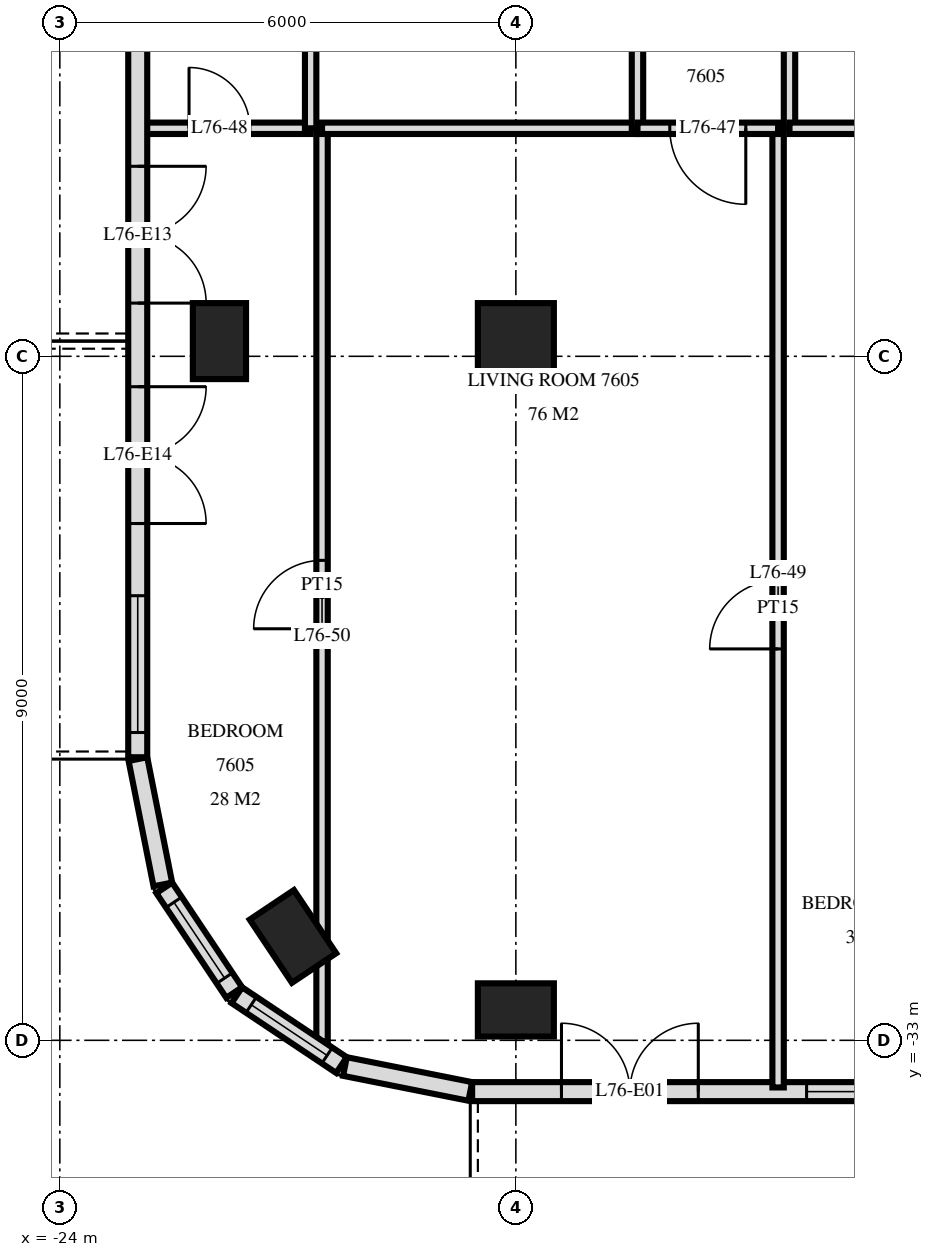
"""IFC4 building model, lengths in metres.
Left out: names, types, materials, properties, quantities, classifications, styles, units other than length and angle.
Written with IfcOpenShell. Run it as: python <this file> out.ifc"""

import sys

from ifc_helpers import new_model, si_unit, direction, frame, frame_2d, origin, origin_2d, place, context, subcontext, project, spatial, rectangle, extrude, element, fill, save


model = new_model("IFC4")
c1 = context("Model", 3, precision=1e-05, world=origin(), true_north=direction((0.0, 1.0)))
c2 = subcontext(c1, "Body", "Model", "MODEL_VIEW")
j1 = project(units=[si_unit("LENGTHUNIT", "METRE"), si_unit("PLANEANGLEUNIT", "RADIAN")], contexts=[c1])
p1 = place(None, origin())
s1 = spatial("IfcSite", under=j1, at=p1, CompositionType="ELEMENT")
p2 = place(p1, origin())
s2 = spatial("IfcBuilding", under=s1, at=p2, CompositionType="ELEMENT")
p3 = place(p2, frame((0.0, 0.0, 287.6)))
s3 = spatial("IfcBuildingStorey", under=s2, at=p3, CompositionType="ELEMENT", Elevation=287.6)
for number, where, z_axis, x_axis in (
    (1, (-21.9, -23.8, 0.0), (0.0, 0.0, 1.0), (0.0, 1.0, 0.0)),
    (2, (-20.933, -31.633, 0.0), (0.0, 0.0, 1.0), (-0.556, 0.831, 0.0)),
    (3, (-18.0, -32.6, 0.0), (0.0, 0.0, 1.0), (1.0, 0.0, 0.0)),
):
    element("IfcColumn", number, at=place(p3, frame(where, z_axis=z_axis, x_axis=x_axis)), inside=s3, PredefinedType="COLUMN", context=c2, shape_type="SweptSolid", body=[
        extrude(rectangle(XDim=1.0, YDim=0.7, at=origin_2d()), origin(), (0.0, 0.0, 1.0), 3.5),
    ])
p4 = place(p3, frame((-18.0, -23.8, 0.0), z_axis=(0.0, 0.0, 1.0), x_axis=(1.0, 0.0, 0.0)))
e4 = element("IfcColumn", 4, at=p4, inside=s3, PredefinedType="COLUMN", context=c2, shape_type="SweptSolid", body=[
    extrude(rectangle(XDim=1.0, YDim=1.0, at=origin_2d()), origin(), (0.0, 0.0, 1.0), 3.5),
])
p5 = place(p3, frame((-22.975, -3.325, 0.0), z_axis=(0.0, 0.0, 1.0), x_axis=(0.0, -1.0, 0.0)))
e5 = element("IfcWall", 5, at=p5, inside=s3, PredefinedType="SOLIDWALL", context=c2, shape_type="SweptSolid", body=[
    extrude(rectangle(XDim=25.951, YDim=0.25, at=frame_2d((12.975, 0.0))), origin(), (0.0, 0.0, 1.0), 3.22),
])
p6 = place(p5, frame((1.475, 0.0, 0.0)))
e6 = element("IfcOpeningElement", 6, at=p6, cuts=e5, PredefinedType="OPENING", context=c2, shape_type="SweptSolid", body=[
    extrude(rectangle(XDim=1.8, YDim=2.4, at=frame_2d((0.9, 1.2))), frame((0.0, 0.135, 0.0), z_axis=(0.0, -1.0, 0.0), x_axis=(1.0, 0.0, 0.0)), (0.0, 0.0, 1.0), 0.27),
])
p7 = place(p5, frame((7.975, 0.0, 0.0)))
e7 = element("IfcOpeningElement", 7, at=p7, cuts=e5, PredefinedType="OPENING", context=c2, shape_type="SweptSolid", body=[
    extrude(rectangle(XDim=1.8, YDim=2.4, at=frame_2d((0.9, 1.2))), frame((0.0, 0.135, 0.0), z_axis=(0.0, -1.0, 0.0), x_axis=(1.0, 0.0, 0.0)), (0.0, 0.0, 1.0), 0.27),
])
p8 = place(p5, frame((18.175, 0.0, 0.0)))
e8 = element("IfcOpeningElement", 8, at=p8, cuts=e5, PredefinedType="OPENING", context=c2, shape_type="SweptSolid", body=[
    extrude(rectangle(XDim=1.8, YDim=2.4, at=frame_2d((0.9, 1.2))), frame((0.0, 0.135, 0.0), z_axis=(0.0, -1.0, 0.0), x_axis=(1.0, 0.0, 0.0)), (0.0, 0.0, 1.0), 0.27),
])
p9 = place(p5, frame((21.075, 0.0, 0.0)))
e9 = element("IfcOpeningElement", 9, at=p9, cuts=e5, PredefinedType="OPENING", context=c2, shape_type="SweptSolid", body=[
    extrude(rectangle(XDim=1.8, YDim=2.4, at=frame_2d((0.9, 1.2))), frame((0.0, 0.135, 0.0), z_axis=(0.0, -1.0, 0.0), x_axis=(1.0, 0.0, 0.0)), (0.0, 0.0, 1.0), 0.27),
])
p10 = place(p5, frame((23.825, 0.0, 0.9)))
e10 = element("IfcOpeningElement", 10, at=p10, cuts=e5, PredefinedType="OPENING", context=c2, shape_type="SweptSolid", body=[
    extrude(rectangle(XDim=1.8, YDim=1.5, at=frame_2d((0.9, 0.75))), frame((0.0, 0.135, 0.0), z_axis=(0.0, -1.0, 0.0), x_axis=(1.0, 0.0, 0.0)), (0.0, 0.0, 1.0), 0.27),
])
p11 = place(p3, frame((-22.973, -29.3, 0.0), z_axis=(0.0, 0.0, 1.0), x_axis=(0.19513878023, -0.980775640221, 0.0)))
e11 = element("IfcWall", 11, at=p11, inside=s3, PredefinedType="SOLIDWALL", context=c2, shape_type="SweptSolid", body=[
    extrude(rectangle(XDim=1.681, YDim=0.25, at=frame_2d((0.841, 0.0))), origin(), (0.0, 0.0, 1.0), 3.22),
])
p12 = place(p3, frame((-22.626, -30.994, 0.0), z_axis=(0.0, 0.0, 1.0), x_axis=(0.55555029066, -0.831482937015, 0.0)))
e12 = element("IfcWall", 12, at=p12, inside=s3, PredefinedType="SOLIDWALL", context=c2, shape_type="SweptSolid", body=[
    extrude(rectangle(XDim=1.656, YDim=0.25, at=frame_2d((0.828, 0.0))), origin(), (0.0, 0.0, 1.0), 3.22),
])
p13 = place(p12, frame((0.228, 0.0, 0.9)))
e13 = element("IfcOpeningElement", 13, at=p13, cuts=e12, PredefinedType="OPENING", context=c2, shape_type="SweptSolid", body=[
    extrude(rectangle(XDim=1.2, YDim=1.5, at=frame_2d((0.6, 0.75))), frame((0.0, 0.135, 0.0), z_axis=(0.0, -1.0, 0.0), x_axis=(1.0, 0.0, 0.0)), (0.0, 0.0, 1.0), 0.27),
])
p14 = place(p3, frame((-21.671, -32.406, 0.0), z_axis=(0.0, 0.0, 1.0), x_axis=(0.831482937015, -0.55555029066, 0.0)))
e14 = element("IfcWall", 14, at=p14, inside=s3, PredefinedType="SOLIDWALL", context=c2, shape_type="SweptSolid", body=[
    extrude(rectangle(XDim=1.656, YDim=0.25, at=frame_2d((0.828, 0.0))), origin(), (0.0, 0.0, 1.0), 3.22),
])
p15 = place(p14, frame((0.228, 0.0, 0.9)))
e15 = element("IfcOpeningElement", 15, at=p15, cuts=e14, PredefinedType="OPENING", context=c2, shape_type="SweptSolid", body=[
    extrude(rectangle(XDim=1.2, YDim=1.5, at=frame_2d((0.6, 0.75))), frame((0.0, 0.135, 0.0), z_axis=(0.0, -1.0, 0.0), x_axis=(1.0, 0.0, 0.0)), (0.0, 0.0, 1.0), 0.27),
])
p16 = place(p3, frame((-20.249, -33.344, 0.0), z_axis=(0.0, 0.0, 1.0), x_axis=(0.980770110232, -0.195166572128, 0.0)))
e16 = element("IfcWall", 16, at=p16, inside=s3, PredefinedType="SOLIDWALL", context=c2, shape_type="SweptSolid", body=[
    extrude(rectangle(XDim=1.681, YDim=0.25, at=frame_2d((0.841, 0.0))), origin(), (0.0, 0.0, 1.0), 3.22),
])
p17 = place(p3, frame((-18.575, -33.675, 0.0), z_axis=(0.0, 0.0, 1.0), x_axis=(1.0, 0.0, 0.0)))
e17 = element("IfcWall", 17, at=p17, inside=s3, PredefinedType="SOLIDWALL", context=c2, shape_type="SweptSolid", body=[
    extrude(rectangle(XDim=37.151, YDim=0.25, at=frame_2d((18.575, 0.0))), origin(), (0.0, 0.0, 1.0), 3.22),
])
p18 = place(p17, frame((1.175, 0.0, 0.0)))
e18 = element("IfcOpeningElement", 18, at=p18, cuts=e17, PredefinedType="OPENING", context=c2, shape_type="SweptSolid", body=[
    extrude(rectangle(XDim=1.8, YDim=2.4, at=frame_2d((0.9, 1.2))), frame((0.0, 0.135, 0.0), z_axis=(0.0, -1.0, 0.0), x_axis=(1.0, 0.0, 0.0)), (0.0, 0.0, 1.0), 0.27),
])
p19 = place(p17, frame((4.4, 0.0, 0.9)))
e19 = element("IfcOpeningElement", 19, at=p19, cuts=e17, PredefinedType="OPENING", context=c2, shape_type="SweptSolid", body=[
    extrude(rectangle(XDim=1.8, YDim=1.5, at=frame_2d((0.9, 0.75))), frame((0.0, 0.135, 0.0), z_axis=(0.0, -1.0, 0.0), x_axis=(1.0, 0.0, 0.0)), (0.0, 0.0, 1.0), 0.27),
])
p20 = place(p17, frame((6.875, 0.0, 0.9)))
e20 = element("IfcOpeningElement", 20, at=p20, cuts=e17, PredefinedType="OPENING", context=c2, shape_type="SweptSolid", body=[
    extrude(rectangle(XDim=2.4, YDim=1.5, at=frame_2d((1.2, 0.75))), frame((0.0, 0.135, 0.0), z_axis=(0.0, -1.0, 0.0), x_axis=(1.0, 0.0, 0.0)), (0.0, 0.0, 1.0), 0.27),
])
p21 = place(p17, frame((10.175, 0.0, 0.0)))
e21 = element("IfcOpeningElement", 21, at=p21, cuts=e17, PredefinedType="OPENING", context=c2, shape_type="SweptSolid", body=[
    extrude(rectangle(XDim=1.8, YDim=2.4, at=frame_2d((0.9, 1.2))), frame((0.0, 0.135, 0.0), z_axis=(0.0, -1.0, 0.0), x_axis=(1.0, 0.0, 0.0)), (0.0, 0.0, 1.0), 0.27),
])
p22 = place(p17, frame((13.175, 0.0, 0.0)))
e22 = element("IfcOpeningElement", 22, at=p22, cuts=e17, PredefinedType="OPENING", context=c2, shape_type="SweptSolid", body=[
    extrude(rectangle(XDim=1.8, YDim=2.4, at=frame_2d((0.9, 1.2))), frame((0.0, 0.135, 0.0), z_axis=(0.0, -1.0, 0.0), x_axis=(1.0, 0.0, 0.0)), (0.0, 0.0, 1.0), 0.27),
])
p23 = place(p17, frame((15.875, 0.0, 0.9)))
e23 = element("IfcOpeningElement", 23, at=p23, cuts=e17, PredefinedType="OPENING", context=c2, shape_type="SweptSolid", body=[
    extrude(rectangle(XDim=2.4, YDim=1.5, at=frame_2d((1.2, 0.75))), frame((0.0, 0.135, 0.0), z_axis=(0.0, -1.0, 0.0), x_axis=(1.0, 0.0, 0.0)), (0.0, 0.0, 1.0), 0.27),
])
p24 = place(p17, frame((19.175, 0.0, 0.0)))
e24 = element("IfcOpeningElement", 24, at=p24, cuts=e17, PredefinedType="OPENING", context=c2, shape_type="SweptSolid", body=[
    extrude(rectangle(XDim=1.8, YDim=2.4, at=frame_2d((0.9, 1.2))), frame((0.0, 0.135, 0.0), z_axis=(0.0, -1.0, 0.0), x_axis=(1.0, 0.0, 0.0)), (0.0, 0.0, 1.0), 0.27),
])
p25 = place(p17, frame((21.875, 0.0, 0.9)))
e25 = element("IfcOpeningElement", 25, at=p25, cuts=e17, PredefinedType="OPENING", context=c2, shape_type="SweptSolid", body=[
    extrude(rectangle(XDim=2.4, YDim=1.5, at=frame_2d((1.2, 0.75))), frame((0.0, 0.135, 0.0), z_axis=(0.0, -1.0, 0.0), x_axis=(1.0, 0.0, 0.0)), (0.0, 0.0, 1.0), 0.27),
])
p26 = place(p17, frame((25.063, 0.0, 0.9)))
e26 = element("IfcOpeningElement", 26, at=p26, cuts=e17, PredefinedType="OPENING", context=c2, shape_type="SweptSolid", body=[
    extrude(rectangle(XDim=1.8, YDim=1.5, at=frame_2d((0.9, 0.75))), frame((0.0, 0.135, 0.0), z_axis=(0.0, -1.0, 0.0), x_axis=(1.0, 0.0, 0.0)), (0.0, 0.0, 1.0), 0.27),
])
p27 = place(p17, frame((27.838, 0.0, 0.0)))
e27 = element("IfcOpeningElement", 27, at=p27, cuts=e17, PredefinedType="OPENING", context=c2, shape_type="SweptSolid", body=[
    extrude(rectangle(XDim=1.8, YDim=2.4, at=frame_2d((0.9, 1.2))), frame((0.0, 0.135, 0.0), z_axis=(0.0, -1.0, 0.0), x_axis=(1.0, 0.0, 0.0)), (0.0, 0.0, 1.0), 0.27),
])
p28 = place(p17, frame((31.175, 0.0, 0.0)))
e28 = element("IfcOpeningElement", 28, at=p28, cuts=e17, PredefinedType="OPENING", context=c2, shape_type="SweptSolid", body=[
    extrude(rectangle(XDim=1.8, YDim=2.4, at=frame_2d((0.9, 1.2))), frame((0.0, 0.135, 0.0), z_axis=(0.0, -1.0, 0.0), x_axis=(1.0, 0.0, 0.0)), (0.0, 0.0, 1.0), 0.27),
])
p29 = place(p3, frame((-14.4, -21.0, 0.0), z_axis=(0.0, 0.0, 1.0), x_axis=(0.0, 1.0, 0.0)))
e29 = element("IfcWall", 29, at=p29, inside=s3, PredefinedType="PARTITIONING", context=c2, shape_type="SweptSolid", body=[
    extrude(rectangle(XDim=4.2, YDim=0.15, at=frame_2d((2.1, 0.0))), origin(), (0.0, 0.0, 1.0), 3.22),
])
p30 = place(p29, frame((1.6, 0.0, 0.0)))
e30 = element("IfcOpeningElement", 30, at=p30, cuts=e29, PredefinedType="OPENING", context=c2, shape_type="SweptSolid", body=[
    extrude(rectangle(XDim=1.0, YDim=2.1, at=frame_2d((0.5, 1.05))), frame((0.0, 0.085, 0.0), z_axis=(0.0, -1.0, 0.0), x_axis=(1.0, 0.0, 0.0)), (0.0, 0.0, 1.0), 0.17),
])
p31 = place(p3, frame((-14.55, -33.62, 0.0), z_axis=(0.0, 0.0, 1.0), x_axis=(0.0, 1.0, 0.0)))
e31 = element("IfcWall", 31, at=p31, inside=s3, PredefinedType="PARTITIONING", context=c2, shape_type="SweptSolid", body=[
    extrude(rectangle(XDim=12.62, YDim=0.15, at=frame_2d((6.31, 0.0))), origin(), (0.0, 0.0, 1.0), 3.22),
])
p32 = place(p31, frame((5.77, 0.0, 0.0)))
e32 = element("IfcOpeningElement", 32, at=p32, cuts=e31, PredefinedType="OPENING", context=c2, shape_type="SweptSolid", body=[
    extrude(rectangle(XDim=0.9, YDim=2.1, at=frame_2d((0.45, 1.05))), frame((0.0, 0.085, 0.0), z_axis=(0.0, -1.0, 0.0), x_axis=(1.0, 0.0, 0.0)), (0.0, 0.0, 1.0), 0.17),
])
p33 = place(p3, frame((-16.4, -21.0, 0.0), z_axis=(0.0, 0.0, 1.0), x_axis=(0.0, 1.0, 0.0)))
e33 = element("IfcWall", 33, at=p33, inside=s3, PredefinedType="PARTITIONING", context=c2, shape_type="SweptSolid", body=[
    extrude(rectangle(XDim=4.2, YDim=0.15, at=frame_2d((2.1, 0.0))), origin(), (0.0, 0.0, 1.0), 3.22),
])
p34 = place(p33, frame((1.6, 0.0, 0.0)))
e34 = element("IfcOpeningElement", 34, at=p34, cuts=e33, PredefinedType="OPENING", context=c2, shape_type="SweptSolid", body=[
    extrude(rectangle(XDim=1.0, YDim=2.1, at=frame_2d((0.5, 1.05))), frame((0.0, 0.085, 0.0), z_axis=(0.0, -1.0, 0.0), x_axis=(1.0, 0.0, 0.0)), (0.0, 0.0, 1.0), 0.17),
])
p35 = place(p3, frame((-20.55, -33.017, 0.0), z_axis=(0.0, 0.0, 1.0), x_axis=(0.0, 1.0, 0.0)))
e35 = element("IfcWall", 35, at=p35, inside=s3, PredefinedType="PARTITIONING", context=c2, shape_type="SweptSolid", body=[
    extrude(rectangle(XDim=12.017, YDim=0.15, at=frame_2d((6.008, 0.0))), origin(), (0.0, 0.0, 1.0), 3.22),
])
p36 = place(p35, frame((5.432, 0.0, 0.0)))
e36 = element("IfcOpeningElement", 36, at=p36, cuts=e35, PredefinedType="OPENING", context=c2, shape_type="SweptSolid", body=[
    extrude(rectangle(XDim=0.9, YDim=2.1, at=frame_2d((0.45, 1.05))), frame((0.0, 0.085, 0.0), z_axis=(0.0, -1.0, 0.0), x_axis=(1.0, 0.0, 0.0)), (0.0, 0.0, 1.0), 0.17),
])
p37 = place(p3, frame((-20.7, -21.0, 0.0), z_axis=(0.0, 0.0, 1.0), x_axis=(0.0, 1.0, 0.0)))
e37 = element("IfcWall", 37, at=p37, inside=s3, PredefinedType="PARTITIONING", context=c2, shape_type="SweptSolid", body=[
    extrude(rectangle(XDim=4.2, YDim=0.15, at=frame_2d((2.1, 0.0))), origin(), (0.0, 0.0, 1.0), 3.22),
])
p38 = place(p3, frame((-16.4, -21.0, 0.0), z_axis=(0.0, 0.0, 1.0), x_axis=(1.0, 0.0, 0.0)))
e38 = element("IfcWall", 38, at=p38, inside=s3, PredefinedType="PARTITIONING", context=c2, shape_type="SweptSolid", body=[
    extrude(rectangle(XDim=1.85, YDim=0.15, at=frame_2d((0.925, 0.0))), origin(), (0.0, 0.0, 1.0), 3.22),
])
p39 = place(p38, frame((0.425, 0.0, 0.0)))
e39 = element("IfcOpeningElement", 39, at=p39, cuts=e38, PredefinedType="OPENING", context=c2, shape_type="SweptSolid", body=[
    extrude(rectangle(XDim=1.0, YDim=2.1, at=frame_2d((0.5, 1.05))), frame((0.0, 0.085, 0.0), z_axis=(0.0, -1.0, 0.0), x_axis=(1.0, 0.0, 0.0)), (0.0, 0.0, 1.0), 0.17),
])
p40 = place(p3, frame((-22.92, -21.0, 0.0), z_axis=(0.0, 0.0, 1.0), x_axis=(1.0, 0.0, 0.0)))
e40 = element("IfcWall", 40, at=p40, inside=s3, PredefinedType="PARTITIONING", context=c2, shape_type="SweptSolid", body=[
    extrude(rectangle(XDim=2.22, YDim=0.15, at=frame_2d((1.11, 0.0))), origin(), (0.0, 0.0, 1.0), 3.22),
])
p41 = place(p40, frame((0.62, 0.0, 0.0)))
e41 = element("IfcOpeningElement", 41, at=p41, cuts=e40, PredefinedType="OPENING", context=c2, shape_type="SweptSolid", body=[
    extrude(rectangle(XDim=0.8, YDim=2.1, at=frame_2d((0.4, 1.05))), frame((0.0, 0.085, 0.0), z_axis=(0.0, -1.0, 0.0), x_axis=(1.0, 0.0, 0.0)), (0.0, 0.0, 1.0), 0.17),
])
p42 = place(p3, frame((-20.55, -21.0, 0.0), z_axis=(0.0, 0.0, 1.0), x_axis=(1.0, 0.0, 0.0)))
e42 = element("IfcWall", 42, at=p42, inside=s3, PredefinedType="PARTITIONING", context=c2, shape_type="SweptSolid", body=[
    extrude(rectangle(XDim=4.15, YDim=0.15, at=frame_2d((2.075, 0.0))), origin(), (0.0, 0.0, 1.0), 3.22),
])
p43 = place(p3, frame((-14.4, -21.0, 0.0), z_axis=(0.0, 0.0, 1.0), x_axis=(1.0, 0.0, 0.0)))
e43 = element("IfcWall", 43, at=p43, inside=s3, PredefinedType="PARTITIONING", context=c2, shape_type="SweptSolid", body=[
    extrude(rectangle(XDim=2.4, YDim=0.15, at=frame_2d((1.2, 0.0))), origin(), (0.0, 0.0, 1.0), 3.22),
])
p44 = place(p13, origin())
e44 = element("IfcWindow", 44, at=p44, inside=s3, PartitioningType="SINGLE_PANEL", PredefinedType="WINDOW", context=c2, shape_type="SweptSolid", body=[
    extrude(rectangle(XDim=1.2, YDim=1.5, at=frame_2d((0.6, 0.75))), frame((0.0, 0.03, 0.0), z_axis=(0.0, -1.0, 0.0), x_axis=(1.0, 0.0, 0.0)), (0.0, 0.0, 1.0), 0.06),
])
fill(e13, e44)
p45 = place(p15, origin())
e45 = element("IfcWindow", 45, at=p45, inside=s3, PartitioningType="SINGLE_PANEL", PredefinedType="WINDOW", context=c2, shape_type="SweptSolid", body=[
    extrude(rectangle(XDim=1.2, YDim=1.5, at=frame_2d((0.6, 0.75))), frame((0.0, 0.03, 0.0), z_axis=(0.0, -1.0, 0.0), x_axis=(1.0, 0.0, 0.0)), (0.0, 0.0, 1.0), 0.06),
])
fill(e15, e45)
p46 = place(p18, origin())
e46 = element("IfcDoor", 46, at=p46, inside=s3, OperationType="DOUBLE_DOOR_SINGLE_SWING", PredefinedType="DOOR", context=c2, shape_type="SweptSolid", body=[
    extrude(rectangle(XDim=1.8, YDim=2.4, at=frame_2d((0.9, 1.2))), frame((0.0, 0.025, 0.0), z_axis=(0.0, -1.0, 0.0), x_axis=(1.0, 0.0, 0.0)), (0.0, 0.0, 1.0), 0.05),
])
fill(e18, e46)
p47 = place(p19, origin())
e47 = element("IfcWindow", 47, at=p47, inside=s3, PartitioningType="SINGLE_PANEL", PredefinedType="WINDOW", context=c2, shape_type="SweptSolid", body=[
    extrude(rectangle(XDim=1.8, YDim=1.5, at=frame_2d((0.9, 0.75))), frame((0.0, 0.03, 0.0), z_axis=(0.0, -1.0, 0.0), x_axis=(1.0, 0.0, 0.0)), (0.0, 0.0, 1.0), 0.06),
])
fill(e19, e47)
p48 = place(p8, origin())
e48 = element("IfcDoor", 48, at=p48, inside=s3, OperationType="DOUBLE_DOOR_SINGLE_SWING", PredefinedType="DOOR", context=c2, shape_type="SweptSolid", body=[
    extrude(rectangle(XDim=1.8, YDim=2.4, at=frame_2d((0.9, 1.2))), frame((0.0, 0.025, 0.0), z_axis=(0.0, -1.0, 0.0), x_axis=(1.0, 0.0, 0.0)), (0.0, 0.0, 1.0), 0.05),
])
fill(e8, e48)
p49 = place(p9, origin())
e49 = element("IfcDoor", 49, at=p49, inside=s3, OperationType="DOUBLE_DOOR_SINGLE_SWING", PredefinedType="DOOR", context=c2, shape_type="SweptSolid", body=[
    extrude(rectangle(XDim=1.8, YDim=2.4, at=frame_2d((0.9, 1.2))), frame((0.0, 0.025, 0.0), z_axis=(0.0, -1.0, 0.0), x_axis=(1.0, 0.0, 0.0)), (0.0, 0.0, 1.0), 0.05),
])
fill(e9, e49)
p50 = place(p10, origin())
e50 = element("IfcWindow", 50, at=p50, inside=s3, PartitioningType="SINGLE_PANEL", PredefinedType="WINDOW", context=c2, shape_type="SweptSolid", body=[
    extrude(rectangle(XDim=1.8, YDim=1.5, at=frame_2d((0.9, 0.75))), frame((0.0, 0.03, 0.0), z_axis=(0.0, -1.0, 0.0), x_axis=(1.0, 0.0, 0.0)), (0.0, 0.0, 1.0), 0.06),
])
fill(e10, e50)
p51 = place(p39, frame((0.5, 0.0, 0.0), z_axis=(0.0, 0.0, 1.0), x_axis=(-1.0, 0.0, 0.0)))
e51 = element("IfcDoor", 51, at=p51, inside=s3, OperationType="SINGLE_SWING_RIGHT", PredefinedType="DOOR", context=c2, shape_type="SweptSolid", body=[
    extrude(rectangle(XDim=1.0, YDim=2.1, at=frame_2d((0.0, 1.05))), frame((0.0, -0.025, 0.0), z_axis=(0.0, 1.0, 0.0), x_axis=(-1.0, 0.0, 0.0)), (0.0, 0.0, 1.0), 0.05),
])
fill(e39, e51)
p52 = place(p41, origin())
e52 = element("IfcDoor", 52, at=p52, inside=s3, OperationType="SINGLE_SWING_RIGHT", PredefinedType="DOOR", context=c2, shape_type="SweptSolid", body=[
    extrude(rectangle(XDim=0.8, YDim=2.1, at=frame_2d((0.4, 1.05))), frame((0.0, 0.025, 0.0), z_axis=(0.0, -1.0, 0.0), x_axis=(1.0, 0.0, 0.0)), (0.0, 0.0, 1.0), 0.05),
])
fill(e41, e52)
p53 = place(p32, origin())
e53 = element("IfcDoor", 53, at=p53, inside=s3, OperationType="SINGLE_SWING_RIGHT", PredefinedType="DOOR", context=c2, shape_type="SweptSolid", body=[
    extrude(rectangle(XDim=0.9, YDim=2.1, at=frame_2d((0.45, 1.05))), frame((0.0, 0.025, 0.0), z_axis=(0.0, -1.0, 0.0), x_axis=(1.0, 0.0, 0.0)), (0.0, 0.0, 1.0), 0.05),
])
fill(e32, e53)
p54 = place(p36, origin())
e54 = element("IfcDoor", 54, at=p54, inside=s3, OperationType="SINGLE_SWING_RIGHT", PredefinedType="DOOR", context=c2, shape_type="SweptSolid", body=[
    extrude(rectangle(XDim=0.9, YDim=2.1, at=frame_2d((0.45, 1.05))), frame((0.0, 0.025, 0.0), z_axis=(0.0, -1.0, 0.0), x_axis=(1.0, 0.0, 0.0)), (0.0, 0.0, 1.0), 0.05),
])
fill(e36, e54)
save(model, sys.argv[1])
